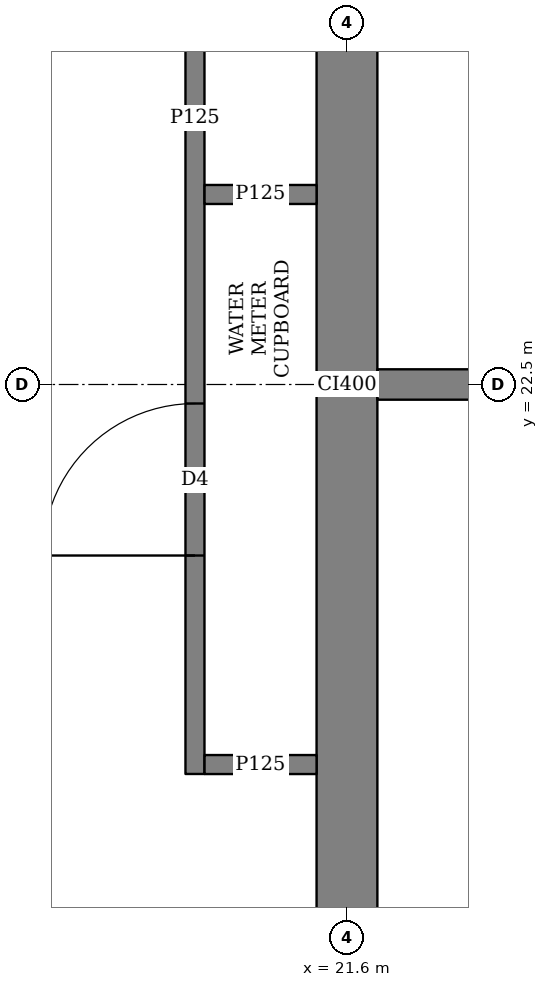
"""IFC4 building model, lengths in metres.
Left out: names, types, materials, properties, quantities, classifications, styles, units other than length and angle.
Written with IfcOpenShell. Run it as: python <this file> out.ifc"""

import sys

from ifc_helpers import new_model, si_unit, direction, frame, frame_2d, origin, place, context, subcontext, project, spatial, rectangle, extrude, element, fill, save


model = new_model("IFC4")
c1 = context("Model", 3, precision=1e-05, world=origin(), true_north=direction((0.0, 1.0)))
c2 = subcontext(c1, "Body", "Model", "MODEL_VIEW")
j1 = project(units=[si_unit("LENGTHUNIT", "METRE"), si_unit("PLANEANGLEUNIT", "RADIAN")], contexts=[c1])
p1 = place(None, origin())
s1 = spatial("IfcSite", under=j1, at=p1, CompositionType="ELEMENT")
p2 = place(p1, origin())
s2 = spatial("IfcBuilding", under=s1, at=p2, CompositionType="ELEMENT")
p3 = place(p2, frame((0.0, 0.0, 111.65)))
s3 = spatial("IfcBuildingStorey", under=s2, at=p3, CompositionType="ELEMENT", Elevation=111.65)
p4 = place(p3, frame((21.6, 15.45, 0.0), z_axis=(0.0, 0.0, 1.0), x_axis=(0.0, 1.0, 0.0)))
e1 = element("IfcWall", 1, at=p4, inside=s3, PredefinedType="SHEAR", context=c2, shape_type="SweptSolid", body=[
    extrude(rectangle(XDim=14.1, YDim=0.4, at=frame_2d((7.05, 0.0))), origin(), (0.0, 0.0, 1.0), 3.75),
])
p5 = place(p3, frame((20.6, 19.938, 0.0), z_axis=(0.0, 0.0, 1.0), x_axis=(0.0, 1.0, 0.0)))
e2 = element("IfcWall", 2, at=p5, inside=s3, PredefinedType="PARTITIONING", context=c2, shape_type="SweptSolid", body=[
    extrude(rectangle(XDim=8.624, YDim=0.125, at=frame_2d((4.312, 0.0))), origin(), (0.0, 0.0, 1.0), 3.5),
])
p6 = place(p5, frame((1.437, 0.0, 0.0)))
e3 = element("IfcOpeningElement", 3, at=p6, cuts=e2, PredefinedType="OPENING", context=c2, shape_type="SweptSolid", body=[
    extrude(rectangle(XDim=1.0, YDim=2.1, at=frame_2d((0.5, 1.05))), frame((0.0, 0.073, 0.0), z_axis=(0.0, -1.0, 0.0), x_axis=(1.0, 0.0, 0.0)), (0.0, 0.0, 1.0), 0.145),
])
p7 = place(p5, frame((5.687, 0.0, 0.0)))
e4 = element("IfcOpeningElement", 4, at=p7, cuts=e2, PredefinedType="OPENING", context=c2, shape_type="SweptSolid", body=[
    extrude(rectangle(XDim=1.0, YDim=2.1, at=frame_2d((0.5, 1.05))), frame((0.0, 0.073, 0.0), z_axis=(0.0, -1.0, 0.0), x_axis=(1.0, 0.0, 0.0)), (0.0, 0.0, 1.0), 0.145),
])
for number, where, z_axis, x_axis in (
    (5, (20.663, 20.0, 0.0), (0.0, 0.0, 1.0), (1.0, 0.0, 0.0)),
    (6, (20.663, 23.75, 0.0), (0.0, 0.0, 1.0), (1.0, 0.0, 0.0)),
):
    element("IfcWall", number, at=place(p3, frame(where, z_axis=z_axis, x_axis=x_axis)), inside=s3, PredefinedType="PARTITIONING", context=c2, shape_type="SweptSolid", body=[
        extrude(rectangle(XDim=0.737, YDim=0.125, at=frame_2d((0.368, 0.0))), origin(), (0.0, 0.0, 1.0), 3.5),
    ])
p8 = place(p3, frame((21.8, 22.5, 0.0), z_axis=(0.0, 0.0, 1.0), x_axis=(1.0, 0.0, 0.0)))
e7 = element("IfcWall", 7, at=p8, inside=s3, PredefinedType="SOLIDWALL", context=c2, shape_type="SweptSolid", body=[
    extrude(rectangle(XDim=2.2, YDim=0.2, at=frame_2d((1.1, 0.0))), origin(), (0.0, 0.0, 1.0), 3.5),
])
p9 = place(p6, origin())
e8 = element("IfcDoor", 8, at=p9, inside=s3, OperationType="SINGLE_SWING_LEFT", PredefinedType="DOOR", context=c2, shape_type="SweptSolid", body=[
    extrude(rectangle(XDim=1.0, YDim=2.1, at=frame_2d((0.5, 1.05))), frame((0.0, 0.025, 0.0), z_axis=(0.0, -1.0, 0.0), x_axis=(1.0, 0.0, 0.0)), (0.0, 0.0, 1.0), 0.05),
])
fill(e3, e8)
save(model, sys.argv[1])
